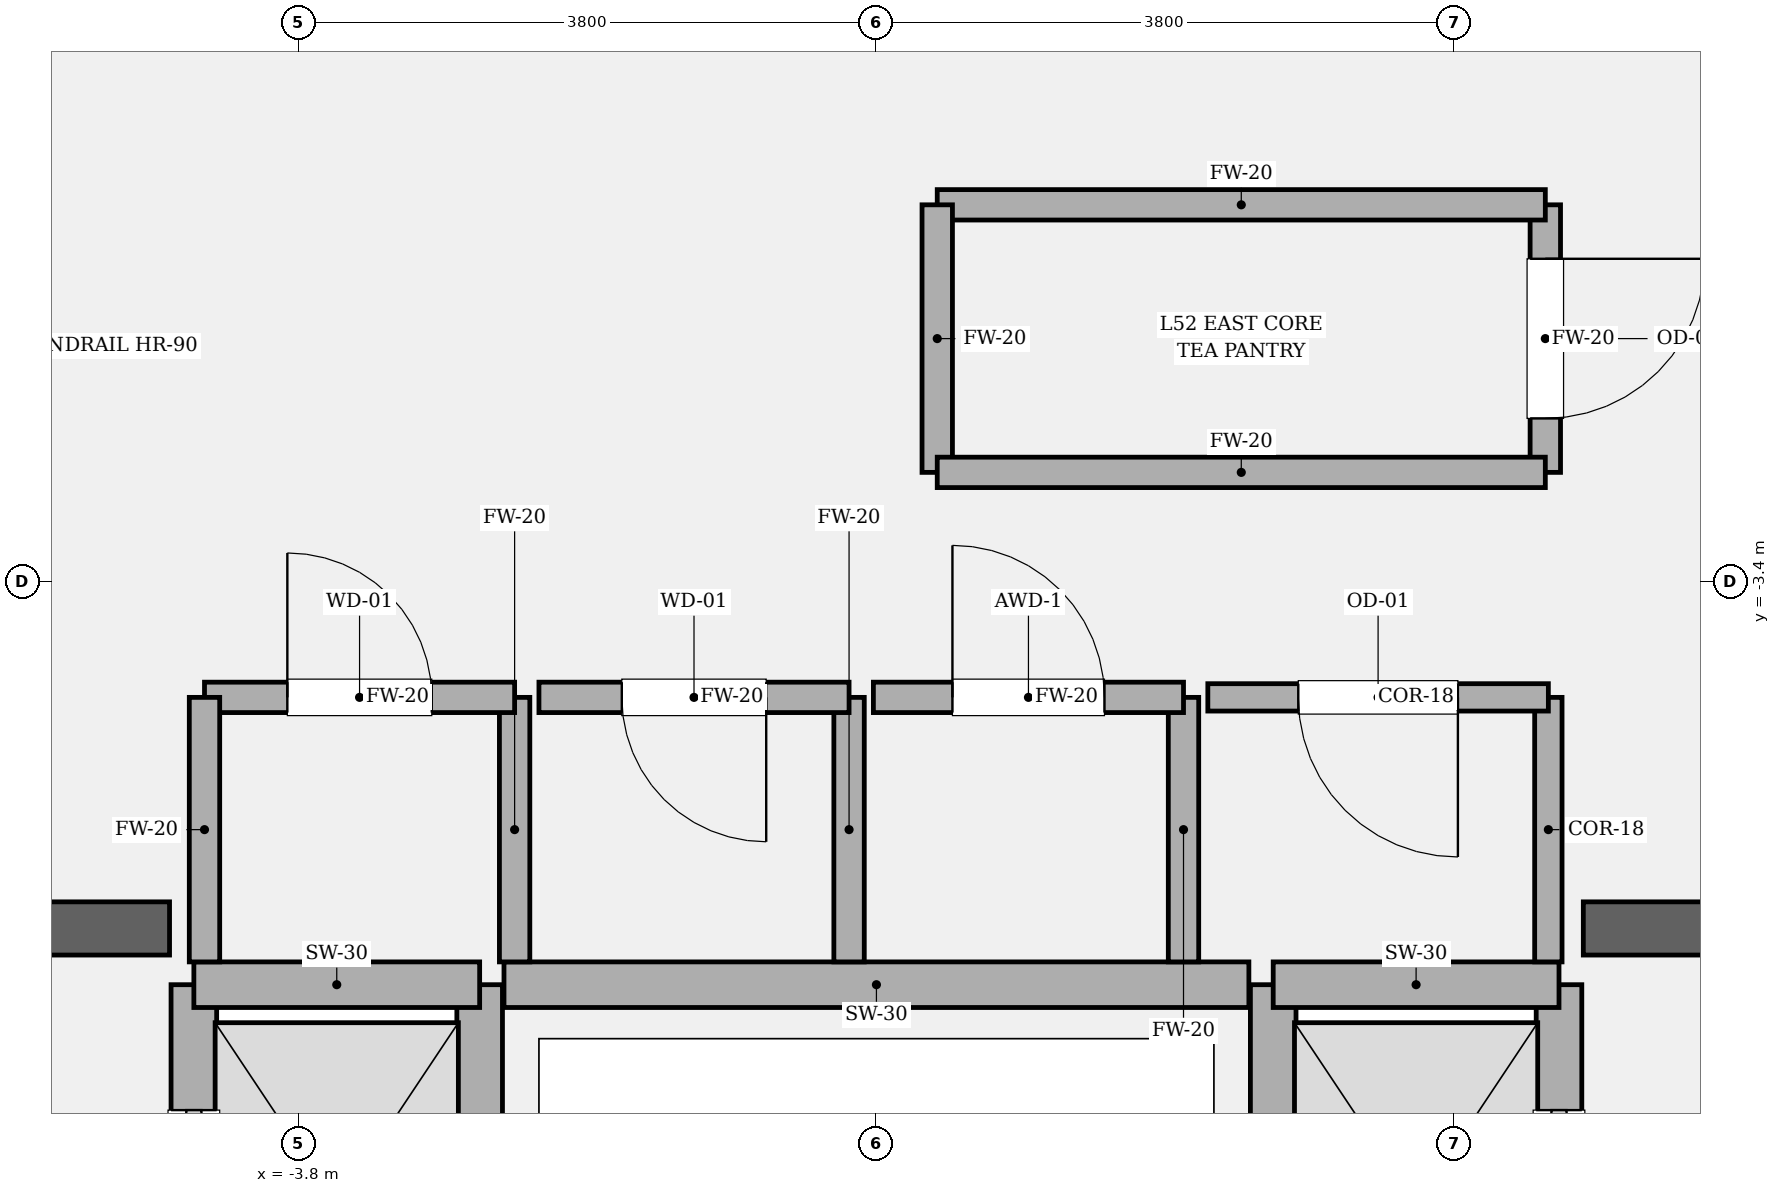
"""IFC4 building model, lengths in metres.
Left out: names, types, materials, properties, quantities, classifications, styles, units other than length and angle.
Written with IfcOpenShell. Run it as: python <this file> out.ifc"""

import sys

from ifc_helpers import new_model, si_unit, direction, frame, frame_2d, origin, place, context, subcontext, project, spatial, rectangle, extrude, element, fill, save


model = new_model("IFC4")
c1 = context("Model", 3, precision=1e-05, world=origin(), true_north=direction((0.0, 1.0)))
c2 = subcontext(c1, "Body", "Model", "MODEL_VIEW")
j1 = project(units=[si_unit("LENGTHUNIT", "METRE"), si_unit("PLANEANGLEUNIT", "RADIAN")], contexts=[c1])
p1 = place(None, origin())
s1 = spatial("IfcSite", under=j1, at=p1, CompositionType="ELEMENT")
p2 = place(p1, origin())
s2 = spatial("IfcBuilding", under=s1, at=p2, CompositionType="ELEMENT")
p3 = place(p2, frame((0.0, 0.0, 220.8)))
s3 = spatial("IfcBuildingStorey", under=s2, at=p3, CompositionType="ELEMENT", Elevation=220.8)
p4 = place(p3, frame((-9.875, -5.68, 0.0), z_axis=(0.0, 0.0, 1.0), x_axis=(1.0, 0.0, 0.0)))
e1 = element("IfcWall", 1, at=p4, inside=s3, PredefinedType="SOLIDWALL", context=c2, shape_type="SweptSolid", body=[
    extrude(rectangle(XDim=5.225, YDim=0.35, at=frame_2d((2.613, 0.0))), origin(), (0.0, 0.0, 1.0), 4.05),
])
p5 = place(p4, frame((1.335, 0.0, 0.0)))
e2 = element("IfcOpeningElement", 2, at=p5, cuts=e1, PredefinedType="OPENING", context=c2, shape_type="SweptSolid", body=[
    extrude(rectangle(XDim=1.18, YDim=2.2, at=frame_2d((0.59, 1.1))), frame((0.0, 0.185, 0.0), z_axis=(0.0, -1.0, 0.0), x_axis=(1.0, 0.0, 0.0)), (0.0, 0.0, 1.0), 0.37),
])
p6 = place(p3, frame((4.65, -5.68, 0.0), z_axis=(0.0, 0.0, 1.0), x_axis=(1.0, 0.0, 0.0)))
e3 = element("IfcWall", 3, at=p6, inside=s3, PredefinedType="SOLIDWALL", context=c2, shape_type="SweptSolid", body=[
    extrude(rectangle(XDim=5.225, YDim=0.35, at=frame_2d((2.613, 0.0))), origin(), (0.0, 0.0, 1.0), 4.05),
])
p7 = place(p6, frame((2.71, 0.0, 0.0)))
e4 = element("IfcOpeningElement", 4, at=p7, cuts=e3, PredefinedType="OPENING", context=c2, shape_type="SweptSolid", body=[
    extrude(rectangle(XDim=1.18, YDim=2.2, at=frame_2d((0.59, 1.1))), frame((0.0, 0.185, 0.0), z_axis=(0.0, -1.0, 0.0), x_axis=(1.0, 0.0, 0.0)), (0.0, 0.0, 1.0), 0.37),
])
p8 = place(p3, frame((-4.49, -8.82, 0.0), z_axis=(0.0, 0.0, 1.0), x_axis=(0.0, 1.0, 0.0)))
e5 = element("IfcWall", 5, at=p8, inside=s3, PredefinedType="SOLIDWALL", context=c2, shape_type="SweptSolid", body=[
    extrude(rectangle(XDim=2.77, YDim=0.3, at=frame_2d((1.385, 0.0))), origin(), (0.0, 0.0, 1.0), 3.83),
])
p9 = place(p8, frame((0.825, 0.0, 0.0)))
e6 = element("IfcOpeningElement", 6, at=p9, cuts=e5, PredefinedType="OPENING", context=c2, shape_type="SweptSolid", body=[
    extrude(rectangle(XDim=1.12, YDim=2.25, at=frame_2d((0.56, 1.125))), frame((0.0, 0.16, 0.0), z_axis=(0.0, -1.0, 0.0), x_axis=(1.0, 0.0, 0.0)), (0.0, 0.0, 1.0), 0.32),
])
p10 = place(p3, frame((-2.61, -8.82, 0.0), z_axis=(0.0, 0.0, 1.0), x_axis=(0.0, 1.0, 0.0)))
e7 = element("IfcWall", 7, at=p10, inside=s3, PredefinedType="SOLIDWALL", context=c2, shape_type="SweptSolid", body=[
    extrude(rectangle(XDim=2.77, YDim=0.3, at=frame_2d((1.385, 0.0))), origin(), (0.0, 0.0, 1.0), 3.83),
])
p11 = place(p3, frame((-4.49, -6.05, 0.0), z_axis=(0.0, 0.0, 1.0), x_axis=(1.0, 0.0, 0.0)))
e8 = element("IfcWall", 8, at=p11, inside=s3, PredefinedType="SOLIDWALL", context=c2, shape_type="SweptSolid", body=[
    extrude(rectangle(XDim=1.88, YDim=0.3, at=frame_2d((0.94, 0.0))), origin(), (0.0, 0.0, 1.0), 3.83),
])
p12 = place(p3, frame((4.49, -8.82, 0.0), z_axis=(0.0, 0.0, 1.0), x_axis=(0.0, 1.0, 0.0)))
e9 = element("IfcWall", 9, at=p12, inside=s3, PredefinedType="SOLIDWALL", context=c2, shape_type="SweptSolid", body=[
    extrude(rectangle(XDim=2.77, YDim=0.3, at=frame_2d((1.385, 0.0))), origin(), (0.0, 0.0, 1.0), 3.83),
])
p13 = place(p12, frame((0.825, 0.0, 0.0)))
e10 = element("IfcOpeningElement", 10, at=p13, cuts=e9, PredefinedType="OPENING", context=c2, shape_type="SweptSolid", body=[
    extrude(rectangle(XDim=1.12, YDim=2.25, at=frame_2d((0.56, 1.125))), frame((0.0, 0.16, 0.0), z_axis=(0.0, -1.0, 0.0), x_axis=(1.0, 0.0, 0.0)), (0.0, 0.0, 1.0), 0.32),
])
p14 = place(p3, frame((2.61, -8.82, 0.0), z_axis=(0.0, 0.0, 1.0), x_axis=(0.0, 1.0, 0.0)))
e11 = element("IfcWall", 11, at=p14, inside=s3, PredefinedType="SOLIDWALL", context=c2, shape_type="SweptSolid", body=[
    extrude(rectangle(XDim=2.77, YDim=0.3, at=frame_2d((1.385, 0.0))), origin(), (0.0, 0.0, 1.0), 3.83),
])
p15 = place(p3, frame((2.61, -6.05, 0.0), z_axis=(0.0, 0.0, 1.0), x_axis=(1.0, 0.0, 0.0)))
e12 = element("IfcWall", 12, at=p15, inside=s3, PredefinedType="SOLIDWALL", context=c2, shape_type="SweptSolid", body=[
    extrude(rectangle(XDim=1.88, YDim=0.3, at=frame_2d((0.94, 0.0))), origin(), (0.0, 0.0, 1.0), 3.83),
])
p16 = place(p3, frame((-2.45, -6.05, 0.0), z_axis=(0.0, 0.0, 1.0), x_axis=(1.0, 0.0, 0.0)))
e13 = element("IfcWall", 13, at=p16, inside=s3, PredefinedType="SOLIDWALL", context=c2, shape_type="SweptSolid", body=[
    extrude(rectangle(XDim=4.9, YDim=0.3, at=frame_2d((2.45, 0.0))), origin(), (0.0, 0.0, 1.0), 3.83),
])
p17 = place(p3, frame((-2.38, -5.9, 0.0), z_axis=(0.0, 0.0, 1.0), x_axis=(0.0, 1.0, 0.0)))
e14 = element("IfcWall", 14, at=p17, inside=s3, PredefinedType="SOLIDWALL", context=c2, shape_type="SweptSolid", body=[
    extrude(rectangle(XDim=1.74, YDim=0.2, at=frame_2d((0.87, 0.0))), origin(), (0.0, 0.0, 1.0), 3.83),
])
p18 = place(p3, frame((-2.38, -4.16, 0.0), z_axis=(0.0, 0.0, 1.0), x_axis=(-1.0, 0.0, 0.0)))
e15 = element("IfcWall", 15, at=p18, inside=s3, PredefinedType="SOLIDWALL", context=c2, shape_type="SweptSolid", body=[
    extrude(rectangle(XDim=2.04, YDim=0.2, at=frame_2d((1.02, 0.0))), origin(), (0.0, 0.0, 1.0), 3.83),
])
p19 = place(p18, frame((0.545, 0.0, 0.0)))
e16 = element("IfcOpeningElement", 16, at=p19, cuts=e15, PredefinedType="OPENING", context=c2, shape_type="SweptSolid", body=[
    extrude(rectangle(XDim=0.95, YDim=2.15, at=frame_2d((0.475, 1.075))), frame((0.0, 0.11, 0.0), z_axis=(0.0, -1.0, 0.0), x_axis=(1.0, 0.0, 0.0)), (0.0, 0.0, 1.0), 0.22),
])
for number, where, z_axis, x_axis in (
    (17, (-4.42, -4.16, 0.0), (0.0, 0.0, 1.0), (0.0, -1.0, 0.0)),
    (18, (-0.18, -5.9, 0.0), (0.0, 0.0, 1.0), (0.0, 1.0, 0.0)),
):
    element("IfcWall", number, at=place(p3, frame(where, z_axis=z_axis, x_axis=x_axis)), inside=s3, PredefinedType="SOLIDWALL", context=c2, shape_type="SweptSolid", body=[
        extrude(rectangle(XDim=1.74, YDim=0.2, at=frame_2d((0.87, 0.0))), origin(), (0.0, 0.0, 1.0), 3.83),
    ])
p20 = place(p3, frame((-0.18, -4.16, 0.0), z_axis=(0.0, 0.0, 1.0), x_axis=(-1.0, 0.0, 0.0)))
e19 = element("IfcWall", 19, at=p20, inside=s3, PredefinedType="SOLIDWALL", context=c2, shape_type="SweptSolid", body=[
    extrude(rectangle(XDim=2.04, YDim=0.2, at=frame_2d((1.02, 0.0))), origin(), (0.0, 0.0, 1.0), 3.83),
])
p21 = place(p20, frame((0.545, 0.0, 0.0)))
e20 = element("IfcOpeningElement", 20, at=p21, cuts=e19, PredefinedType="OPENING", context=c2, shape_type="SweptSolid", body=[
    extrude(rectangle(XDim=0.95, YDim=2.15, at=frame_2d((0.475, 1.075))), frame((0.0, 0.11, 0.0), z_axis=(0.0, -1.0, 0.0), x_axis=(1.0, 0.0, 0.0)), (0.0, 0.0, 1.0), 0.22),
])
p22 = place(p3, frame((2.02, -5.9, 0.0), z_axis=(0.0, 0.0, 1.0), x_axis=(0.0, 1.0, 0.0)))
e21 = element("IfcWall", 21, at=p22, inside=s3, PredefinedType="SOLIDWALL", context=c2, shape_type="SweptSolid", body=[
    extrude(rectangle(XDim=1.74, YDim=0.2, at=frame_2d((0.87, 0.0))), origin(), (0.0, 0.0, 1.0), 3.83),
])
p23 = place(p3, frame((2.02, -4.16, 0.0), z_axis=(0.0, 0.0, 1.0), x_axis=(-1.0, 0.0, 0.0)))
e22 = element("IfcWall", 22, at=p23, inside=s3, PredefinedType="SOLIDWALL", context=c2, shape_type="SweptSolid", body=[
    extrude(rectangle(XDim=2.04, YDim=0.2, at=frame_2d((1.02, 0.0))), origin(), (0.0, 0.0, 1.0), 3.83),
])
p24 = place(p23, frame((0.52, 0.0, 0.0)))
e23 = element("IfcOpeningElement", 23, at=p24, cuts=e22, PredefinedType="OPENING", context=c2, shape_type="SweptSolid", body=[
    extrude(rectangle(XDim=1.0, YDim=2.15, at=frame_2d((0.5, 1.075))), frame((0.0, 0.11, 0.0), z_axis=(0.0, -1.0, 0.0), x_axis=(1.0, 0.0, 0.0)), (0.0, 0.0, 1.0), 0.22),
])
p25 = place(p3, frame((4.42, -5.9, 0.0), z_axis=(0.0, 0.0, 1.0), x_axis=(0.0, 1.0, 0.0)))
e24 = element("IfcWall", 24, at=p25, inside=s3, PredefinedType="PARTITIONING", context=c2, shape_type="SweptSolid", body=[
    extrude(rectangle(XDim=1.74, YDim=0.18, at=frame_2d((0.87, 0.0))), origin(), (0.0, 0.0, 1.0), 3.83),
])
p26 = place(p3, frame((4.42, -4.16, 0.0), z_axis=(0.0, 0.0, 1.0), x_axis=(-1.0, 0.0, 0.0)))
e25 = element("IfcWall", 25, at=p26, inside=s3, PredefinedType="PARTITIONING", context=c2, shape_type="SweptSolid", body=[
    extrude(rectangle(XDim=2.24, YDim=0.18, at=frame_2d((1.12, 0.0))), origin(), (0.0, 0.0, 1.0), 3.83),
])
p27 = place(p26, frame((0.595, 0.0, 0.0)))
e26 = element("IfcOpeningElement", 26, at=p27, cuts=e25, PredefinedType="OPENING", context=c2, shape_type="SweptSolid", body=[
    extrude(rectangle(XDim=1.05, YDim=2.2, at=frame_2d((0.525, 1.1))), frame((0.0, 0.1, 0.0), z_axis=(0.0, -1.0, 0.0), x_axis=(1.0, 0.0, 0.0)), (0.0, 0.0, 1.0), 0.2),
])
p28 = place(p3, frame((4.4, -2.68, 0.0), z_axis=(0.0, 0.0, 1.0), x_axis=(0.0, 1.0, 0.0)))
e27 = element("IfcWall", 27, at=p28, inside=s3, PredefinedType="SOLIDWALL", context=c2, shape_type="SweptSolid", body=[
    extrude(rectangle(XDim=1.76, YDim=0.2, at=frame_2d((0.88, 0.0))), origin(), (0.0, 0.0, 1.0), 3.83),
])
p29 = place(p28, frame((0.355, 0.0, 0.0)))
e28 = element("IfcOpeningElement", 28, at=p29, cuts=e27, PredefinedType="OPENING", context=c2, shape_type="SweptSolid", body=[
    extrude(rectangle(XDim=1.05, YDim=2.2, at=frame_2d((0.525, 1.1))), frame((0.0, 0.11, 0.0), z_axis=(0.0, -1.0, 0.0), x_axis=(1.0, 0.0, 0.0)), (0.0, 0.0, 1.0), 0.22),
])
p30 = place(p3, frame((4.4, -0.92, 0.0), z_axis=(0.0, 0.0, 1.0), x_axis=(-1.0, 0.0, 0.0)))
e29 = element("IfcWall", 29, at=p30, inside=s3, PredefinedType="SOLIDWALL", context=c2, shape_type="SweptSolid", body=[
    extrude(rectangle(XDim=4.0, YDim=0.2, at=frame_2d((2.0, 0.0))), origin(), (0.0, 0.0, 1.0), 3.83),
])
p31 = place(p3, frame((0.4, -0.92, 0.0), z_axis=(0.0, 0.0, 1.0), x_axis=(0.0, -1.0, 0.0)))
e30 = element("IfcWall", 30, at=p31, inside=s3, PredefinedType="SOLIDWALL", context=c2, shape_type="SweptSolid", body=[
    extrude(rectangle(XDim=1.76, YDim=0.2, at=frame_2d((0.88, 0.0))), origin(), (0.0, 0.0, 1.0), 3.83),
])
p32 = place(p3, frame((0.4, -2.68, 0.0), z_axis=(0.0, 0.0, 1.0), x_axis=(1.0, 0.0, 0.0)))
e31 = element("IfcWall", 31, at=p32, inside=s3, PredefinedType="SOLIDWALL", context=c2, shape_type="SweptSolid", body=[
    extrude(rectangle(XDim=4.0, YDim=0.2, at=frame_2d((2.0, 0.0))), origin(), (0.0, 0.0, 1.0), 3.83),
])
p33 = place(p9, origin())
e32 = element("IfcDoor", 32, at=p33, inside=s3, OperationType="SLIDING_TO_LEFT", PredefinedType="DOOR", context=c2, shape_type="SweptSolid", body=[
    extrude(rectangle(XDim=1.12, YDim=2.25, at=frame_2d((0.56, 1.125))), frame((0.0, 0.025, 0.0), z_axis=(0.0, -1.0, 0.0), x_axis=(1.0, 0.0, 0.0)), (0.0, 0.0, 1.0), 0.05),
])
fill(e6, e32)
p34 = place(p13, origin())
e33 = element("IfcDoor", 33, at=p34, inside=s3, OperationType="SLIDING_TO_RIGHT", PredefinedType="DOOR", context=c2, shape_type="SweptSolid", body=[
    extrude(rectangle(XDim=1.12, YDim=2.25, at=frame_2d((0.56, 1.125))), frame((0.0, 0.025, 0.0), z_axis=(0.0, -1.0, 0.0), x_axis=(1.0, 0.0, 0.0)), (0.0, 0.0, 1.0), 0.05),
])
fill(e10, e33)
p35 = place(p19, origin())
e34 = element("IfcDoor", 34, at=p35, inside=s3, OperationType="SINGLE_SWING_RIGHT", PredefinedType="DOOR", context=c2, shape_type="SweptSolid", body=[
    extrude(rectangle(XDim=0.95, YDim=2.15, at=frame_2d((0.475, 1.075))), frame((0.0, 0.025, 0.0), z_axis=(0.0, -1.0, 0.0), x_axis=(1.0, 0.0, 0.0)), (0.0, 0.0, 1.0), 0.05),
])
fill(e16, e34)
p36 = place(p21, origin())
e35 = element("IfcDoor", 35, at=p36, inside=s3, OperationType="SINGLE_SWING_LEFT", PredefinedType="DOOR", context=c2, shape_type="SweptSolid", body=[
    extrude(rectangle(XDim=0.95, YDim=2.15, at=frame_2d((0.475, 1.075))), frame((0.0, 0.025, 0.0), z_axis=(0.0, -1.0, 0.0), x_axis=(1.0, 0.0, 0.0)), (0.0, 0.0, 1.0), 0.05),
])
fill(e20, e35)
p37 = place(p24, origin())
e36 = element("IfcDoor", 36, at=p37, inside=s3, OperationType="SINGLE_SWING_RIGHT", PredefinedType="DOOR", context=c2, shape_type="SweptSolid", body=[
    extrude(rectangle(XDim=1.0, YDim=2.15, at=frame_2d((0.5, 1.075))), frame((0.0, 0.025, 0.0), z_axis=(0.0, -1.0, 0.0), x_axis=(1.0, 0.0, 0.0)), (0.0, 0.0, 1.0), 0.05),
])
fill(e23, e36)
p38 = place(p27, origin())
e37 = element("IfcDoor", 37, at=p38, inside=s3, OperationType="SINGLE_SWING_LEFT", PredefinedType="DOOR", context=c2, shape_type="SweptSolid", body=[
    extrude(rectangle(XDim=1.05, YDim=2.2, at=frame_2d((0.525, 1.1))), frame((0.0, 0.025, 0.0), z_axis=(0.0, -1.0, 0.0), x_axis=(1.0, 0.0, 0.0)), (0.0, 0.0, 1.0), 0.05),
])
fill(e26, e37)
p39 = place(p29, origin())
e38 = element("IfcDoor", 38, at=p39, inside=s3, OperationType="SINGLE_SWING_RIGHT", PredefinedType="DOOR", context=c2, shape_type="SweptSolid", body=[
    extrude(rectangle(XDim=1.05, YDim=2.2, at=frame_2d((0.525, 1.1))), frame((0.0, 0.025, 0.0), z_axis=(0.0, -1.0, 0.0), x_axis=(1.0, 0.0, 0.0)), (0.0, 0.0, 1.0), 0.05),
])
fill(e28, e38)
save(model, sys.argv[1])
